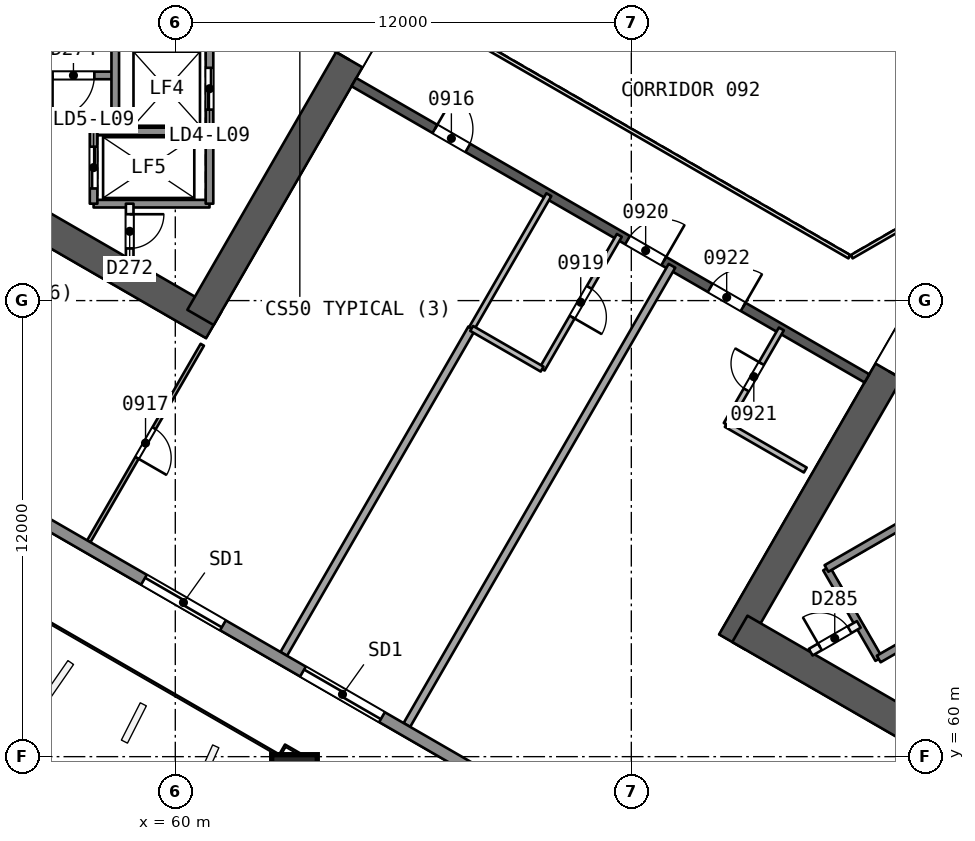
"""IFC4 building model, lengths in metres.
Left out: names, types, materials, properties, quantities, classifications, styles, units other than length and angle.
Written with IfcOpenShell. Run it as: python <this file> out.ifc"""

import sys

from ifc_helpers import new_model, si_unit, direction, frame, frame_2d, origin, origin_2d, place, context, subcontext, project, spatial, rectangle, extrude, element, fill, save


model = new_model("IFC4")
c1 = context("Model", 3, precision=1e-05, world=origin(), true_north=direction((0.0, 1.0)))
c2 = subcontext(c1, "Body", "Model", "MODEL_VIEW")
j1 = project(units=[si_unit("LENGTHUNIT", "METRE"), si_unit("PLANEANGLEUNIT", "RADIAN")], contexts=[c1])
p1 = place(None, origin())
s1 = spatial("IfcSite", under=j1, at=p1, CompositionType="ELEMENT")
p2 = place(p1, origin())
s2 = spatial("IfcBuilding", under=s1, at=p2, CompositionType="ELEMENT")
p3 = place(p2, frame((0.0, 0.0, 44.8)))
s3 = spatial("IfcBuildingStorey", under=s2, at=p3, CompositionType="ELEMENT", Elevation=44.8)
p4 = place(p3, frame((48.797, 78.408, 0.0), z_axis=(0.0, 0.0, 1.0), x_axis=(0.866032504327, -0.499987701298, 0.0)))
e1 = element("IfcWall", 1, at=p4, inside=s3, PredefinedType="SHEAR", context=c2, shape_type="SweptSolid", body=[
    extrude(rectangle(XDim=14.102, YDim=0.8, at=frame_2d((7.051, 0.0))), origin(), (0.0, 0.0, 1.0), 3.7),
])
p5 = place(p3, frame((60.664, 71.557, 0.0), z_axis=(0.0, 0.0, 1.0), x_axis=(0.50000409368, 0.866023040284, 0.0)))
e2 = element("IfcWall", 2, at=p5, inside=s3, PredefinedType="SHEAR", context=c2, shape_type="SweptSolid", body=[
    extrude(rectangle(XDim=9.98, YDim=0.8, at=frame_2d((4.99, 0.0))), origin(), (0.0, 0.0, 1.0), 3.7),
])
p6 = place(p5, frame((7.83, 0.0, 0.0)))
e3 = element("IfcOpeningElement", 3, at=p6, cuts=e2, PredefinedType="OPENING", context=c2, shape_type="SweptSolid", body=[
    extrude(rectangle(XDim=1.2, YDim=2.1, at=frame_2d((0.6, 1.05))), frame((0.0, 0.411, 0.0), z_axis=(0.0, -1.0, 0.0), x_axis=(1.0, 0.0, 0.0)), (0.0, 0.0, 1.0), 0.821),
])
p7 = place(p3, frame((79.731, 71.806, 0.0), z_axis=(0.0, 0.0, 1.0), x_axis=(-0.49999662545, -0.866027352073, 0.0)))
e4 = element("IfcWall", 4, at=p7, inside=s3, PredefinedType="SHEAR", context=c2, shape_type="SweptSolid", body=[
    extrude(rectangle(XDim=10.149, YDim=0.8, at=frame_2d((5.074, 0.0))), origin(), (0.0, 0.0, 1.0), 3.7),
])
p8 = place(p7, frame((0.719, 0.0, 0.0)))
e5 = element("IfcOpeningElement", 5, at=p8, cuts=e4, PredefinedType="OPENING", context=c2, shape_type="SweptSolid", body=[
    extrude(rectangle(XDim=1.2, YDim=2.1, at=frame_2d((0.6, 1.05))), frame((0.0, 0.411, 0.0), z_axis=(0.0, -1.0, 0.0), x_axis=(1.0, 0.0, 0.0)), (0.0, 0.0, 1.0), 0.821),
])
p9 = place(p3, frame((74.856, 63.363, 0.0), z_axis=(0.0, 0.0, 1.0), x_axis=(0.866029478545, -0.499992942241, 0.0)))
e6 = element("IfcWall", 6, at=p9, inside=s3, PredefinedType="SHEAR", context=c2, shape_type="SweptSolid", body=[
    extrude(rectangle(XDim=13.933, YDim=0.8, at=frame_2d((6.967, 0.0))), origin(), (0.0, 0.0, 1.0), 3.7),
])
p10 = place(p3, frame((64.7, 77.748, 0.0), z_axis=(0.0, 0.0, 1.0), x_axis=(0.866026492143, -0.499998114903, 0.0)))
e7 = element("IfcWall", 7, at=p10, inside=s3, PredefinedType="SHEAR", context=c2, shape_type="SweptSolid", body=[
    extrude(rectangle(XDim=15.588, YDim=0.25, at=frame_2d((7.794, 0.0))), origin(), (0.0, 0.0, 1.0), 3.2),
])
p11 = place(p10, frame((2.462, 0.0, 0.0)))
e8 = element("IfcOpeningElement", 8, at=p11, cuts=e7, PredefinedType="OPENING", context=c2, shape_type="SweptSolid", body=[
    extrude(rectangle(XDim=1.0, YDim=2.1, at=frame_2d((0.5, 1.05))), frame((0.0, 0.135, 0.0), z_axis=(0.0, -1.0, 0.0), x_axis=(1.0, 0.0, 0.0)), (0.0, 0.0, 1.0), 0.271),
])
p12 = place(p10, frame((8.315, 0.0, 0.0)))
e9 = element("IfcOpeningElement", 9, at=p12, cuts=e7, PredefinedType="OPENING", context=c2, shape_type="SweptSolid", body=[
    extrude(rectangle(XDim=1.1, YDim=2.1, at=frame_2d((0.55, 1.05))), frame((0.0, 0.135, 0.0), z_axis=(0.0, -1.0, 0.0), x_axis=(1.0, 0.0, 0.0)), (0.0, 0.0, 1.0), 0.271),
])
p13 = place(p10, frame((10.827, 0.0, 0.0)))
e10 = element("IfcOpeningElement", 10, at=p13, cuts=e7, PredefinedType="OPENING", context=c2, shape_type="SweptSolid", body=[
    extrude(rectangle(XDim=1.0, YDim=2.1, at=frame_2d((0.5, 1.05))), frame((0.0, 0.135, 0.0), z_axis=(0.0, -1.0, 0.0), x_axis=(1.0, 0.0, 0.0)), (0.0, 0.0, 1.0), 0.271),
])
p14 = place(p3, frame((63.125, 59.431, 0.0), z_axis=(0.010093620709, 0.017482414954, 0.999796221231), x_axis=(-0.866022643586, 0.500004780773, 1.3036e-08)))
e11 = element("IfcColumn", 11, at=p14, inside=s3, PredefinedType="COLUMN", context=c2, shape_type="SweptSolid", body=[
    extrude(rectangle(XDim=1.2, YDim=1.2, at=origin_2d()), origin(), (0.0, 0.0, 1.0), 3.701),
])
p15 = place(p3, frame((60.71, 70.838, 0.0), z_axis=(0.0, 0.0, 1.0), x_axis=(-0.49998544381, -0.866033807642, 0.0)))
e12 = element("IfcWall", 12, at=p15, inside=s3, PredefinedType="PARTITIONING", context=c2, shape_type="SweptSolid", body=[
    extrude(rectangle(XDim=5.973, YDim=0.1, at=frame_2d((2.987, 0.0))), origin(), (0.0, 0.0, 1.0), 3.2),
])
p16 = place(p15, frame((2.537, 0.0, 0.0)))
e13 = element("IfcOpeningElement", 13, at=p16, cuts=e12, PredefinedType="OPENING", context=c2, shape_type="SweptSolid", body=[
    extrude(rectangle(XDim=0.9, YDim=2.1, at=frame_2d((0.45, 1.05))), frame((0.0, 0.061, 0.0), z_axis=(0.0, -1.0, 0.0), x_axis=(1.0, 0.0, 0.0)), (0.0, 0.0, 1.0), 0.121),
])
p17 = place(p3, frame((62.854, 62.704, 0.0), z_axis=(0.0, 0.0, 1.0), x_axis=(0.499983889192, 0.866034705164, 0.0)))
e14 = element("IfcWall", 14, at=p17, inside=s3, PredefinedType="PARTITIONING", context=c2, shape_type="SweptSolid", body=[
    extrude(rectangle(XDim=9.889, YDim=0.2, at=frame_2d((4.944, 0.0))), origin(), (0.0, 0.0, 1.0), 3.2),
])
p18 = place(p3, frame((67.798, 71.268, 0.0), z_axis=(0.0, 0.0, 1.0), x_axis=(0.500029316959, 0.866008476969, 0.0)))
e15 = element("IfcWall", 15, at=p18, inside=s3, PredefinedType="PARTITIONING", context=c2, shape_type="SweptSolid", body=[
    extrude(rectangle(XDim=4.063, YDim=0.15, at=frame_2d((2.032, 0.0))), origin(), (0.0, 0.0, 1.0), 3.2),
])
p19 = place(p3, frame((71.684, 73.716, 0.0), z_axis=(0.0, 0.0, 1.0), x_axis=(-0.500010271798, -0.866019473278, 0.0)))
e16 = element("IfcWall", 16, at=p19, inside=s3, PredefinedType="PARTITIONING", context=c2, shape_type="SweptSolid", body=[
    extrude(rectangle(XDim=4.063, YDim=0.15, at=frame_2d((2.031, 0.0))), origin(), (0.0, 0.0, 1.0), 3.2),
])
p20 = place(p19, frame((1.582, 0.0, 0.0)))
e17 = element("IfcOpeningElement", 17, at=p20, cuts=e16, PredefinedType="OPENING", context=c2, shape_type="SweptSolid", body=[
    extrude(rectangle(XDim=0.9, YDim=2.1, at=frame_2d((0.45, 1.05))), frame((0.0, 0.085, 0.0), z_axis=(0.0, -1.0, 0.0), x_axis=(1.0, 0.0, 0.0)), (0.0, 0.0, 1.0), 0.171),
])
p21 = place(p3, frame((69.653, 70.197, 0.0), z_axis=(0.0, 0.0, 1.0), x_axis=(-0.86605268637, 0.499952742198, 0.0)))
e18 = element("IfcWall", 18, at=p21, inside=s3, PredefinedType="PARTITIONING", context=c2, shape_type="SweptSolid", body=[
    extrude(rectangle(XDim=2.141, YDim=0.15, at=frame_2d((1.071, 0.0))), origin(), (0.0, 0.0, 1.0), 3.2),
])
p22 = place(p3, frame((66.094, 60.833, 0.0), z_axis=(0.0, 0.0, 1.0), x_axis=(0.499997119037, 0.866027067103, 0.0)))
e19 = element("IfcWall", 19, at=p22, inside=s3, PredefinedType="PARTITIONING", context=c2, shape_type="SweptSolid", body=[
    extrude(rectangle(XDim=13.952, YDim=0.2, at=frame_2d((6.976, 0.0))), origin(), (0.0, 0.0, 1.0), 3.2),
])
p23 = place(p3, frame((76.578, 67.542, 0.0), z_axis=(0.0, 0.0, 1.0), x_axis=(-0.866038271014, 0.499977712642, 0.0)))
e20 = element("IfcWall", 20, at=p23, inside=s3, PredefinedType="PARTITIONING", context=c2, shape_type="SweptSolid", body=[
    extrude(rectangle(XDim=2.401, YDim=0.15, at=frame_2d((1.2, 0.0))), origin(), (0.0, 0.0, 1.0), 3.2),
])
p24 = place(p3, frame((74.498, 68.743, 0.0), z_axis=(0.0, 0.0, 1.0), x_axis=(0.499987231761, 0.866032775405, 0.0)))
e21 = element("IfcWall", 21, at=p24, inside=s3, PredefinedType="PARTITIONING", context=c2, shape_type="SweptSolid", body=[
    extrude(rectangle(XDim=2.9, YDim=0.15, at=frame_2d((1.45, 0.0))), origin(), (0.0, 0.0, 1.0), 3.2),
])
p25 = place(p24, frame((1.05, 0.0, 0.0)))
e22 = element("IfcOpeningElement", 22, at=p25, cuts=e21, PredefinedType="OPENING", context=c2, shape_type="SweptSolid", body=[
    extrude(rectangle(XDim=0.8, YDim=2.1, at=frame_2d((0.4, 1.05))), frame((0.0, 0.085, 0.0), z_axis=(0.0, -1.0, 0.0), x_axis=(1.0, 0.0, 0.0)), (0.0, 0.0, 1.0), 0.171),
])
p26 = place(p3, frame((90.798, 46.398, 0.0), z_axis=(0.0, 0.0, 1.0), x_axis=(-0.866025003598, 0.500000693143, 0.0)))
e23 = element("IfcWall", 23, at=p26, inside=s3, PredefinedType="SOLIDWALL", context=c2, shape_type="SweptSolid", body=[
    extrude(rectangle(XDim=60.966, YDim=0.3, at=frame_2d((30.483, 0.0))), origin(), (0.0, 0.0, 1.0), 3.2),
])
p27 = place(p26, frame((29.283, 0.0, 0.0)))
e24 = element("IfcOpeningElement", 24, at=p27, cuts=e23, PredefinedType="OPENING", context=c2, shape_type="SweptSolid", body=[
    extrude(rectangle(XDim=2.4, YDim=2.4, at=frame_2d((1.2, 1.2))), frame((0.0, 0.161, 0.0), z_axis=(0.0, -1.0, 0.0), x_axis=(1.0, 0.0, 0.0)), (0.0, 0.0, 1.0), 0.321),
])
p28 = place(p26, frame((34.115, 0.0, 0.0)))
e25 = element("IfcOpeningElement", 25, at=p28, cuts=e23, PredefinedType="OPENING", context=c2, shape_type="SweptSolid", body=[
    extrude(rectangle(XDim=2.4, YDim=2.4, at=frame_2d((1.2, 1.2))), frame((0.0, 0.161, 0.0), z_axis=(0.0, -1.0, 0.0), x_axis=(1.0, 0.0, 0.0)), (0.0, 0.0, 1.0), 0.321),
])
p29 = place(p26, frame((47.275, 0.0, 0.0)))
e26 = element("IfcOpeningElement", 26, at=p29, cuts=e23, PredefinedType="OPENING", context=c2, shape_type="SweptSolid", body=[
    extrude(rectangle(XDim=2.4, YDim=2.4, at=frame_2d((1.2, 1.2))), frame((0.0, 0.161, 0.0), z_axis=(0.0, -1.0, 0.0), x_axis=(1.0, 0.0, 0.0)), (0.0, 0.0, 1.0), 0.321),
])
p30 = place(p26, frame((13.063, 0.0, 0.0)))
e27 = element("IfcOpeningElement", 27, at=p30, cuts=e23, PredefinedType="OPENING", context=c2, shape_type="SweptSolid", body=[
    extrude(rectangle(XDim=2.4, YDim=2.4, at=frame_2d((1.2, 1.2))), frame((0.0, 0.161, 0.0), z_axis=(0.0, -1.0, 0.0), x_axis=(1.0, 0.0, 0.0)), (0.0, 0.0, 1.0), 0.321),
])
p31 = place(p3, frame((58.42, 77.925, 0.0), z_axis=(0.0, 0.0, 1.0), x_axis=(-1.0, 0.0, 0.0)))
e28 = element("IfcWall", 28, at=p31, inside=s3, PredefinedType="SOLIDWALL", context=c2, shape_type="SweptSolid", body=[
    extrude(rectangle(XDim=7.7, YDim=0.2, at=frame_2d((3.85, 0.0))), origin(), (0.0, 0.0, 1.0), 3.2),
])
p32 = place(p31, frame((0.55, 0.0, 0.0)))
e29 = element("IfcOpeningElement", 29, at=p32, cuts=e28, PredefinedType="OPENING", context=c2, shape_type="SweptSolid", body=[
    extrude(rectangle(XDim=1.1, YDim=2.1, at=frame_2d((0.55, 1.05))), frame((0.0, 0.11, 0.0), z_axis=(0.0, -1.0, 0.0), x_axis=(1.0, 0.0, 0.0)), (0.0, 0.0, 1.0), 0.221),
])
for number, where, z_axis, x_axis in (
    (30, (60.9, 76.45, 0.0), (0.0, 0.0, 1.0), (-1.0, 0.0, 0.0)),
    (31, (60.9, 74.55, 0.0), (0.0, 0.0, 1.0), (-1.0, 0.0, 0.0)),
):
    element("IfcWall", number, at=place(p3, frame(where, z_axis=z_axis, x_axis=x_axis)), inside=s3, PredefinedType="SOLIDWALL", context=c2, shape_type="SweptSolid", body=[
        extrude(rectangle(XDim=3.05, YDim=0.2, at=frame_2d((1.525, 0.0))), origin(), (0.0, 0.0, 1.0), 3.2),
    ])
p33 = place(p3, frame((60.9, 85.45, 0.0), z_axis=(0.0, 0.0, 1.0), x_axis=(0.0, -1.0, 0.0)))
e32 = element("IfcWall", 32, at=p33, inside=s3, PredefinedType="SOLIDWALL", context=c2, shape_type="SweptSolid", body=[
    extrude(rectangle(XDim=10.9, YDim=0.2, at=frame_2d((5.45, 0.0))), origin(), (0.0, 0.0, 1.0), 3.2),
])
p34 = place(p33, frame((0.575, 0.0, 0.0)))
e33 = element("IfcOpeningElement", 33, at=p34, cuts=e32, PredefinedType="OPENING", context=c2, shape_type="SweptSolid", body=[
    extrude(rectangle(XDim=1.1, YDim=2.1, at=frame_2d((0.55, 1.05))), frame((0.0, 0.11, 0.0), z_axis=(0.0, -1.0, 0.0), x_axis=(1.0, 0.0, 0.0)), (0.0, 0.0, 1.0), 0.221),
])
p35 = place(p33, frame((2.825, 0.0, 0.0)))
e34 = element("IfcOpeningElement", 34, at=p35, cuts=e32, PredefinedType="OPENING", context=c2, shape_type="SweptSolid", body=[
    extrude(rectangle(XDim=1.1, YDim=2.1, at=frame_2d((0.55, 1.05))), frame((0.0, 0.11, 0.0), z_axis=(0.0, -1.0, 0.0), x_axis=(1.0, 0.0, 0.0)), (0.0, 0.0, 1.0), 0.221),
])
p36 = place(p33, frame((5.075, 0.0, 0.0)))
e35 = element("IfcOpeningElement", 35, at=p36, cuts=e32, PredefinedType="OPENING", context=c2, shape_type="SweptSolid", body=[
    extrude(rectangle(XDim=1.1, YDim=2.1, at=frame_2d((0.55, 1.05))), frame((0.0, 0.11, 0.0), z_axis=(0.0, -1.0, 0.0), x_axis=(1.0, 0.0, 0.0)), (0.0, 0.0, 1.0), 0.221),
])
p37 = place(p33, frame((7.325, 0.0, 0.0)))
e36 = element("IfcOpeningElement", 36, at=p37, cuts=e32, PredefinedType="OPENING", context=c2, shape_type="SweptSolid", body=[
    extrude(rectangle(XDim=1.1, YDim=2.1, at=frame_2d((0.55, 1.05))), frame((0.0, 0.11, 0.0), z_axis=(0.0, -1.0, 0.0), x_axis=(1.0, 0.0, 0.0)), (0.0, 0.0, 1.0), 0.221),
])
p38 = place(p3, frame((58.8, 74.55, 0.0), z_axis=(0.0, 0.0, 1.0), x_axis=(0.0, -1.0, 0.0)))
e37 = element("IfcWall", 37, at=p38, inside=s3, PredefinedType="PARTITIONING", context=c2, shape_type="SweptSolid", body=[
    extrude(rectangle(XDim=1.455, YDim=0.2, at=frame_2d((0.728, 0.0))), origin(), (0.0, 0.0, 1.0), 3.2),
])
p39 = place(p38, frame((0.278, 0.0, 0.0)))
e38 = element("IfcOpeningElement", 38, at=p39, cuts=e37, PredefinedType="OPENING", context=c2, shape_type="SweptSolid", body=[
    extrude(rectangle(XDim=0.9, YDim=2.1, at=frame_2d((0.45, 1.05))), frame((0.0, 0.11, 0.0), z_axis=(0.0, -1.0, 0.0), x_axis=(1.0, 0.0, 0.0)), (0.0, 0.0, 1.0), 0.221),
])
p40 = place(p3, frame((58.42, 85.45, 0.0), z_axis=(0.0, 0.0, 1.0), x_axis=(0.0, -1.0, 0.0)))
e39 = element("IfcWall", 39, at=p40, inside=s3, PredefinedType="SOLIDWALL", context=c2, shape_type="SweptSolid", body=[
    extrude(rectangle(XDim=9.0, YDim=0.2, at=frame_2d((4.5, 0.0))), origin(), (0.0, 0.0, 1.0), 3.2),
])
p41 = place(p3, frame((57.85, 76.45, 0.0), z_axis=(0.0, 0.0, 1.0), x_axis=(0.0, -1.0, 0.0)))
e40 = element("IfcWall", 40, at=p41, inside=s3, PredefinedType="SOLIDWALL", context=c2, shape_type="SweptSolid", body=[
    extrude(rectangle(XDim=1.9, YDim=0.2, at=frame_2d((0.95, 0.0))), origin(), (0.0, 0.0, 1.0), 3.2),
])
p42 = place(p41, frame((0.4, 0.0, 0.0)))
e41 = element("IfcOpeningElement", 41, at=p42, cuts=e40, PredefinedType="OPENING", context=c2, shape_type="SweptSolid", body=[
    extrude(rectangle(XDim=1.1, YDim=2.1, at=frame_2d((0.55, 1.05))), frame((0.0, 0.11, 0.0), z_axis=(0.0, -1.0, 0.0), x_axis=(1.0, 0.0, 0.0)), (0.0, 0.0, 1.0), 0.221),
])
p43 = place(p3, frame((77.135, 64.952, 0.0), z_axis=(0.0, 0.0, 1.0), x_axis=(0.499996545922, -0.866027397988, 0.0)))
e42 = element("IfcWall", 42, at=p43, inside=s3, PredefinedType="SOLIDWALL", context=c2, shape_type="SweptSolid", body=[
    extrude(rectangle(XDim=2.75, YDim=0.2, at=frame_2d((1.375, 0.0))), origin(), (0.0, 0.0, 1.0), 3.2),
])
p44 = place(p3, frame((77.135, 64.952, 0.0), z_axis=(0.0, 0.0, 1.0), x_axis=(0.866031916153, 0.499988720078, 0.0)))
e43 = element("IfcWall", 43, at=p44, inside=s3, PredefinedType="SOLIDWALL", context=c2, shape_type="SweptSolid", body=[
    extrude(rectangle(XDim=11.35, YDim=0.2, at=frame_2d((5.675, 0.0))), origin(), (0.0, 0.0, 1.0), 3.2),
])
p45 = place(p3, frame((76.72, 62.749, 0.0), z_axis=(0.0, 0.0, 1.0), x_axis=(0.866054810376, 0.49994906283, 0.0)))
e44 = element("IfcWall", 44, at=p45, inside=s3, PredefinedType="PARTITIONING", context=c2, shape_type="SweptSolid", body=[
    extrude(rectangle(XDim=1.461, YDim=0.2, at=frame_2d((0.73, 0.0))), origin(), (0.0, 0.0, 1.0), 3.2),
])
p46 = place(p45, frame((0.281, 0.0, 0.0)))
e45 = element("IfcOpeningElement", 45, at=p46, cuts=e44, PredefinedType="OPENING", context=c2, shape_type="SweptSolid", body=[
    extrude(rectangle(XDim=0.9, YDim=2.1, at=frame_2d((0.45, 1.05))), frame((0.0, 0.11, 0.0), z_axis=(0.0, -1.0, 0.0), x_axis=(1.0, 0.0, 0.0)), (0.0, 0.0, 1.0), 0.221),
])
p47 = place(p3, frame((78.51, 62.57, 0.0), z_axis=(0.0, 0.0, 1.0), x_axis=(0.866053019151, 0.499952165731, 0.0)))
e46 = element("IfcWall", 46, at=p47, inside=s3, PredefinedType="SOLIDWALL", context=c2, shape_type="SweptSolid", body=[
    extrude(rectangle(XDim=2.3, YDim=0.2, at=frame_2d((1.15, 0.0))), origin(), (0.0, 0.0, 1.0), 3.2),
])
p48 = place(p3, frame((67.702, 78.948, 0.0), z_axis=(0.0, 0.0, 1.0), x_axis=(0.866026658274, -0.499997827154, 0.0)))
e47 = element("IfcWall", 47, at=p48, inside=s3, PredefinedType="PARTITIONING", context=c2, shape_type="SweptSolid", body=[
    extrude(rectangle(XDim=11.588, YDim=0.1, at=frame_2d((5.794, 0.0))), origin(), (0.0, 0.0, 1.0), 3.2),
])
p49 = place(p3, frame((77.798, 73.154, 0.0), z_axis=(0.0, 0.0, 1.0), x_axis=(0.866041268327, 0.499972520799, 0.0)))
e48 = element("IfcWall", 48, at=p49, inside=s3, PredefinedType="PARTITIONING", context=c2, shape_type="SweptSolid", body=[
    extrude(rectangle(XDim=2.0, YDim=0.1, at=frame_2d((1.0, 0.0))), origin(), (0.0, 0.0, 1.0), 3.2),
])
p50 = place(p11, origin())
e49 = element("IfcDoor", 49, at=p50, inside=s3, OperationType="SINGLE_SWING_LEFT", PredefinedType="NOTDEFINED", context=c2, shape_type="SweptSolid", body=[
    extrude(rectangle(XDim=1.0, YDim=2.1, at=frame_2d((0.5, 1.05))), frame((0.0, 0.025, 0.0), z_axis=(0.0, -1.0, 0.0), x_axis=(1.0, 0.0, 0.0)), (0.0, 0.0, 1.0), 0.05),
])
fill(e8, e49)
p51 = place(p16, origin())
e50 = element("IfcDoor", 50, at=p51, inside=s3, OperationType="SINGLE_SWING_RIGHT", PredefinedType="NOTDEFINED", context=c2, shape_type="SweptSolid", body=[
    extrude(rectangle(XDim=0.9, YDim=2.1, at=frame_2d((0.45, 1.05))), frame((0.0, 0.025, 0.0), z_axis=(0.0, -1.0, 0.0), x_axis=(1.0, 0.0, 0.0)), (0.0, 0.0, 1.0), 0.05),
])
fill(e13, e50)
p52 = place(p20, origin())
e51 = element("IfcDoor", 51, at=p52, inside=s3, OperationType="SINGLE_SWING_RIGHT", PredefinedType="NOTDEFINED", context=c2, shape_type="SweptSolid", body=[
    extrude(rectangle(XDim=0.9, YDim=2.1, at=frame_2d((0.45, 1.05))), frame((0.0, 0.025, 0.0), z_axis=(0.0, -1.0, 0.0), x_axis=(1.0, 0.0, 0.0)), (0.0, 0.0, 1.0), 0.05),
])
fill(e17, e51)
p53 = place(p12, origin())
e52 = element("IfcDoor", 52, at=p53, inside=s3, OperationType="SINGLE_SWING_RIGHT", PredefinedType="NOTDEFINED", context=c2, shape_type="SweptSolid", body=[
    extrude(rectangle(XDim=1.1, YDim=2.1, at=frame_2d((0.55, 1.05))), frame((0.0, 0.025, 0.0), z_axis=(0.0, -1.0, 0.0), x_axis=(1.0, 0.0, 0.0)), (0.0, 0.0, 1.0), 0.05),
])
fill(e9, e52)
p54 = place(p25, origin())
e53 = element("IfcDoor", 53, at=p54, inside=s3, OperationType="SINGLE_SWING_RIGHT", PredefinedType="NOTDEFINED", context=c2, shape_type="SweptSolid", body=[
    extrude(rectangle(XDim=0.8, YDim=2.1, at=frame_2d((0.4, 1.05))), frame((0.0, 0.025, 0.0), z_axis=(0.0, -1.0, 0.0), x_axis=(1.0, 0.0, 0.0)), (0.0, 0.0, 1.0), 0.05),
])
fill(e22, e53)
p55 = place(p13, origin())
e54 = element("IfcDoor", 54, at=p55, inside=s3, OperationType="SINGLE_SWING_RIGHT", PredefinedType="NOTDEFINED", context=c2, shape_type="SweptSolid", body=[
    extrude(rectangle(XDim=1.0, YDim=2.1, at=frame_2d((0.5, 1.05))), frame((0.0, 0.025, 0.0), z_axis=(0.0, -1.0, 0.0), x_axis=(1.0, 0.0, 0.0)), (0.0, 0.0, 1.0), 0.05),
])
fill(e10, e54)
p56 = place(p27, origin())
e55 = element("IfcDoor", 55, at=p56, inside=s3, OperationType="SLIDING_TO_LEFT", PredefinedType="NOTDEFINED", context=c2, shape_type="SweptSolid", body=[
    extrude(rectangle(XDim=2.4, YDim=2.4, at=frame_2d((1.2, 1.2))), frame((0.0, 0.025, 0.0), z_axis=(0.0, -1.0, 0.0), x_axis=(1.0, 0.0, 0.0)), (0.0, 0.0, 1.0), 0.05),
])
fill(e24, e55)
p57 = place(p28, origin())
e56 = element("IfcDoor", 56, at=p57, inside=s3, OperationType="SLIDING_TO_RIGHT", PredefinedType="NOTDEFINED", context=c2, shape_type="SweptSolid", body=[
    extrude(rectangle(XDim=2.4, YDim=2.4, at=frame_2d((1.2, 1.2))), frame((0.0, 0.025, 0.0), z_axis=(0.0, -1.0, 0.0), x_axis=(1.0, 0.0, 0.0)), (0.0, 0.0, 1.0), 0.05),
])
fill(e25, e56)
p58 = place(p6, origin())
e57 = element("IfcDoor", 57, at=p58, inside=s3, OperationType="SINGLE_SWING_LEFT", PredefinedType="NOTDEFINED", context=c2, shape_type="SweptSolid", body=[
    extrude(rectangle(XDim=1.2, YDim=2.1, at=frame_2d((0.6, 1.05))), frame((0.0, 0.025, 0.0), z_axis=(0.0, -1.0, 0.0), x_axis=(1.0, 0.0, 0.0)), (0.0, 0.0, 1.0), 0.05),
])
fill(e3, e57)
p59 = place(p37, origin())
e58 = element("IfcDoor", 58, at=p59, inside=s3, OperationType="SLIDING_TO_LEFT", PredefinedType="NOTDEFINED", context=c2, shape_type="SweptSolid", body=[
    extrude(rectangle(XDim=1.1, YDim=2.1, at=frame_2d((0.55, 1.05))), frame((0.0, 0.025, 0.0), z_axis=(0.0, -1.0, 0.0), x_axis=(1.0, 0.0, 0.0)), (0.0, 0.0, 1.0), 0.05),
])
fill(e36, e58)
p60 = place(p42, origin())
e59 = element("IfcDoor", 59, at=p60, inside=s3, OperationType="SLIDING_TO_RIGHT", PredefinedType="NOTDEFINED", context=c2, shape_type="SweptSolid", body=[
    extrude(rectangle(XDim=1.1, YDim=2.1, at=frame_2d((0.55, 1.05))), frame((0.0, 0.025, 0.0), z_axis=(0.0, -1.0, 0.0), x_axis=(1.0, 0.0, 0.0)), (0.0, 0.0, 1.0), 0.05),
])
fill(e41, e59)
p61 = place(p39, origin())
e60 = element("IfcDoor", 60, at=p61, inside=s3, OperationType="SINGLE_SWING_LEFT", PredefinedType="NOTDEFINED", context=c2, shape_type="SweptSolid", body=[
    extrude(rectangle(XDim=0.9, YDim=2.1, at=frame_2d((0.45, 1.05))), frame((0.0, 0.025, 0.0), z_axis=(0.0, -1.0, 0.0), x_axis=(1.0, 0.0, 0.0)), (0.0, 0.0, 1.0), 0.05),
])
fill(e38, e60)
p62 = place(p32, origin())
e61 = element("IfcDoor", 61, at=p62, inside=s3, OperationType="SINGLE_SWING_RIGHT", PredefinedType="NOTDEFINED", context=c2, shape_type="SweptSolid", body=[
    extrude(rectangle(XDim=1.1, YDim=2.1, at=frame_2d((0.55, 1.05))), frame((0.0, 0.025, 0.0), z_axis=(0.0, -1.0, 0.0), x_axis=(1.0, 0.0, 0.0)), (0.0, 0.0, 1.0), 0.05),
])
fill(e29, e61)
p63 = place(p8, origin())
e62 = element("IfcDoor", 62, at=p63, inside=s3, OperationType="SINGLE_SWING_RIGHT", PredefinedType="NOTDEFINED", context=c2, shape_type="SweptSolid", body=[
    extrude(rectangle(XDim=1.2, YDim=2.1, at=frame_2d((0.6, 1.05))), frame((0.0, 0.025, 0.0), z_axis=(0.0, -1.0, 0.0), x_axis=(1.0, 0.0, 0.0)), (0.0, 0.0, 1.0), 0.05),
])
fill(e5, e62)
p64 = place(p46, origin())
e63 = element("IfcDoor", 63, at=p64, inside=s3, OperationType="SINGLE_SWING_LEFT", PredefinedType="NOTDEFINED", context=c2, shape_type="SweptSolid", body=[
    extrude(rectangle(XDim=0.9, YDim=2.1, at=frame_2d((0.45, 1.05))), frame((0.0, 0.025, 0.0), z_axis=(0.0, -1.0, 0.0), x_axis=(1.0, 0.0, 0.0)), (0.0, 0.0, 1.0), 0.05),
])
fill(e45, e63)
save(model, sys.argv[1])
